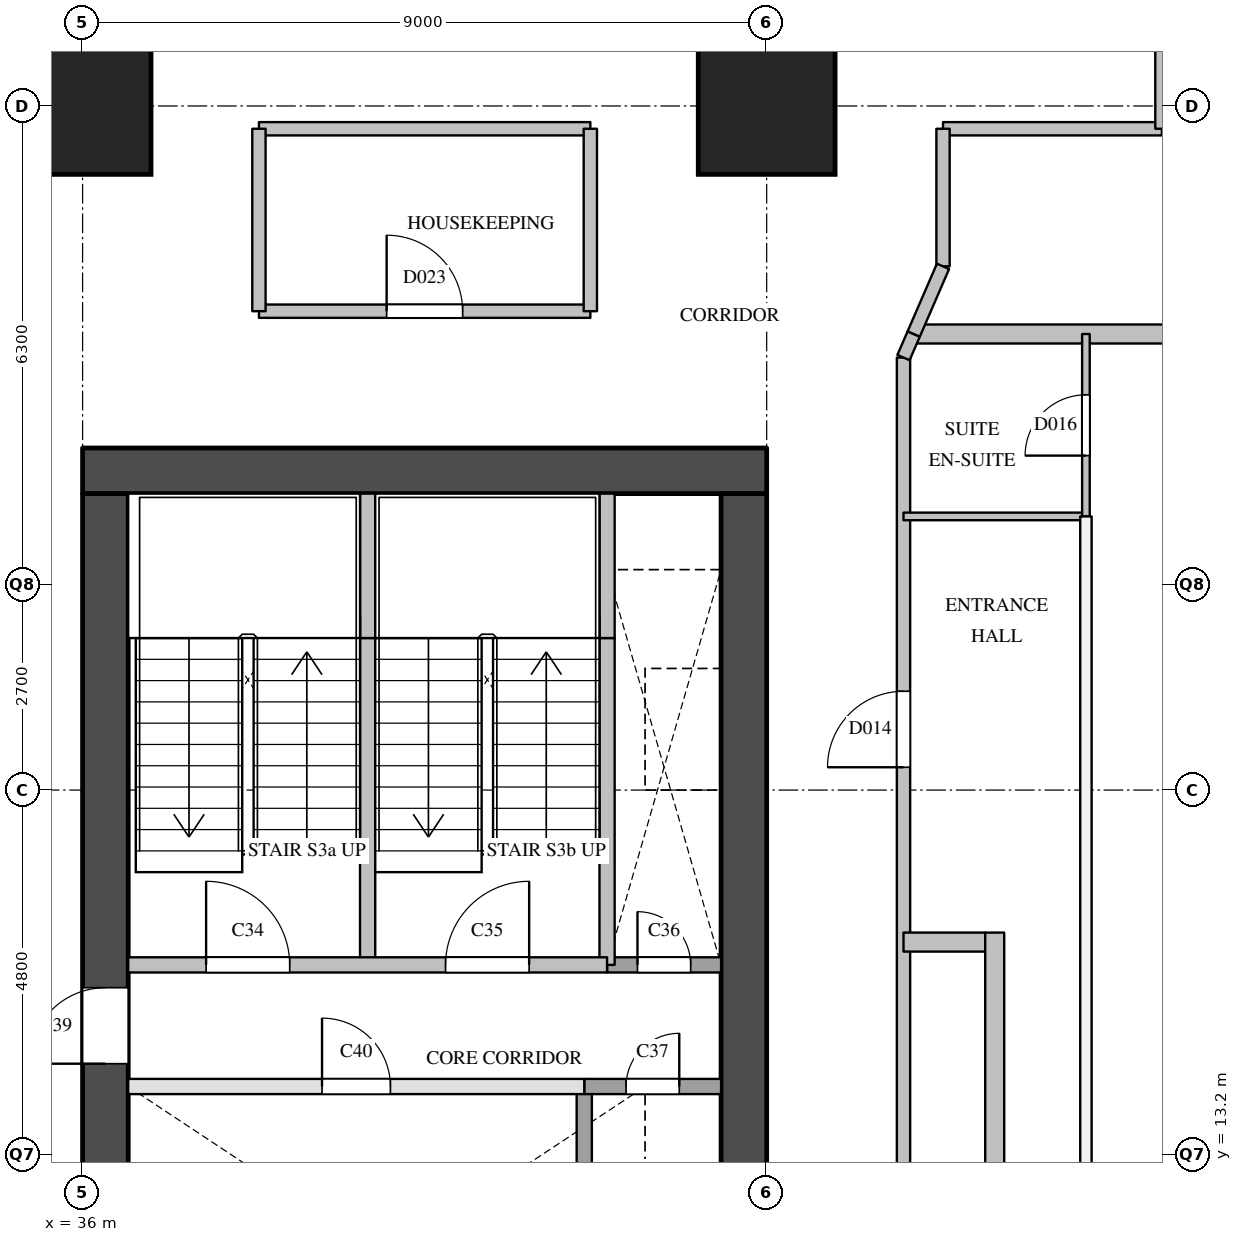
"""IFC4 building model, lengths in metres.
Left out: names, types, materials, properties, quantities, classifications, styles, units other than length and angle.
Written with IfcOpenShell. Run it as: python <this file> out.ifc"""

import sys

from ifc_helpers import new_model, si_unit, direction, frame, frame_2d, origin, origin_2d, place, context, subcontext, project, spatial, rectangle, extrude, element, fill, save


model = new_model("IFC4")
c1 = context("Model", 3, precision=1e-05, world=origin(), true_north=direction((0.0, 1.0)))
c2 = subcontext(c1, "Body", "Model", "MODEL_VIEW")
j1 = project(units=[si_unit("LENGTHUNIT", "METRE"), si_unit("PLANEANGLEUNIT", "RADIAN")], contexts=[c1])
p1 = place(None, origin())
s1 = spatial("IfcSite", under=j1, at=p1, CompositionType="ELEMENT")
p2 = place(p1, origin())
s2 = spatial("IfcBuilding", under=s1, at=p2, CompositionType="ELEMENT")
p3 = place(p2, frame((0.0, 0.0, 81.6)))
s3 = spatial("IfcBuildingStorey", under=s2, at=p3, CompositionType="ELEMENT", Elevation=81.6)
for number, where, z_axis, x_axis in (
    (1, (36.0, 27.0, 0.0), (0.0, 0.0, 1.0), (1.0, 0.0, 0.0)),
    (2, (45.0, 27.0, 0.0), (0.0, 0.0, 1.0), (1.0, 0.0, 0.0)),
):
    element("IfcColumn", number, at=place(p3, frame(where, z_axis=z_axis, x_axis=x_axis)), inside=s3, PredefinedType="COLUMN", context=c2, shape_type="SweptSolid", body=[
        extrude(rectangle(XDim=1.8, YDim=1.8, at=origin_2d()), origin(), (0.0, 0.0, 1.0), 3.8),
    ])
p4 = place(p3, frame((36.0, 22.2, 0.0), z_axis=(0.0, 0.0, 1.0), x_axis=(1.0, 0.0, 0.0)))
e3 = element("IfcWall", 3, at=p4, inside=s3, PredefinedType="SHEAR", context=c2, shape_type="SweptSolid", body=[
    extrude(rectangle(XDim=9.0, YDim=0.6, at=frame_2d((4.5, 0.0))), origin(), (0.0, 0.0, 1.0), 3.5),
])
p5 = place(p3, frame((36.3, 9.6, 0.0), z_axis=(0.0, 0.0, 1.0), x_axis=(0.0, 1.0, 0.0)))
e4 = element("IfcWall", 4, at=p5, inside=s3, PredefinedType="SHEAR", context=c2, shape_type="SweptSolid", body=[
    extrude(rectangle(XDim=12.3, YDim=0.6, at=frame_2d((6.15, 0.0))), origin(), (0.0, 0.0, 1.0), 3.5),
])
p6 = place(p5, frame((0.525, 0.0, 0.0)))
e5 = element("IfcOpeningElement", 5, at=p6, cuts=e4, PredefinedType="OPENING", context=c2, shape_type="SweptSolid", body=[
    extrude(rectangle(XDim=1.2, YDim=2.1, at=frame_2d((0.6, 1.05))), frame((0.0, 0.31, 0.0), z_axis=(0.0, -1.0, 0.0), x_axis=(1.0, 0.0, 0.0)), (0.0, 0.0, 1.0), 0.62),
])
p7 = place(p5, frame((4.8, 0.0, 0.0)))
e6 = element("IfcOpeningElement", 6, at=p7, cuts=e4, PredefinedType="OPENING", context=c2, shape_type="SweptSolid", body=[
    extrude(rectangle(XDim=1.0, YDim=2.1, at=frame_2d((0.5, 1.05))), frame((0.0, 0.31, 0.0), z_axis=(0.0, -1.0, 0.0), x_axis=(1.0, 0.0, 0.0)), (0.0, 0.0, 1.0), 0.62),
])
p8 = place(p3, frame((44.7, 9.6, 0.0), z_axis=(0.0, 0.0, 1.0), x_axis=(0.0, 1.0, 0.0)))
e7 = element("IfcWall", 7, at=p8, inside=s3, PredefinedType="SHEAR", context=c2, shape_type="SweptSolid", body=[
    extrude(rectangle(XDim=12.3, YDim=0.6, at=frame_2d((6.15, 0.0))), origin(), (0.0, 0.0, 1.0), 3.5),
])
p9 = place(p8, frame((0.8, 0.0, 0.0)))
e8 = element("IfcOpeningElement", 8, at=p9, cuts=e7, PredefinedType="OPENING", context=c2, shape_type="SweptSolid", body=[
    extrude(rectangle(XDim=0.7, YDim=2.1, at=frame_2d((0.35, 1.05))), frame((0.0, 0.31, 0.0), z_axis=(0.0, -1.0, 0.0), x_axis=(1.0, 0.0, 0.0)), (0.0, 0.0, 1.0), 0.62),
])
p10 = place(p3, frame((39.75, 15.7, 0.0), z_axis=(0.0, 0.0, 1.0), x_axis=(0.0, 1.0, 0.0)))
e9 = element("IfcWall", 9, at=p10, inside=s3, PredefinedType="SOLIDWALL", context=c2, shape_type="SweptSolid", body=[
    extrude(rectangle(XDim=4.3, YDim=0.2, at=frame_2d((2.15, 0.0))), origin(), (0.0, 0.0, 1.0), 3.5),
])
p11 = place(p3, frame((39.75, 20.0, 0.0), z_axis=(0.0, 0.0, 1.0), x_axis=(0.0, 1.0, 0.0)))
e10 = element("IfcWall", 10, at=p11, inside=s3, PredefinedType="SOLIDWALL", context=c2, shape_type="SweptSolid", body=[
    extrude(rectangle(XDim=1.9, YDim=0.2, at=frame_2d((0.95, 0.0))), origin(), (0.0, 0.0, 1.0), 3.5),
])
p12 = place(p3, frame((42.6, 11.9, 0.0), z_axis=(0.0, 0.0, 1.0), x_axis=(0.0, 1.0, 0.0)))
e11 = element("IfcWall", 11, at=p12, inside=s3, PredefinedType="SOLIDWALL", context=c2, shape_type="SweptSolid", body=[
    extrude(rectangle(XDim=2.2, YDim=0.2, at=frame_2d((1.1, 0.0))), origin(), (0.0, 0.0, 1.0), 3.5),
])
p13 = place(p3, frame((42.9, 15.7, 0.0), z_axis=(0.0, 0.0, 1.0), x_axis=(0.0, 1.0, 0.0)))
e12 = element("IfcWall", 12, at=p13, inside=s3, PredefinedType="SOLIDWALL", context=c2, shape_type="SweptSolid", body=[
    extrude(rectangle(XDim=4.3, YDim=0.2, at=frame_2d((2.15, 0.0))), origin(), (0.0, 0.0, 1.0), 3.5),
])
p14 = place(p3, frame((42.9, 20.0, 0.0), z_axis=(0.0, 0.0, 1.0), x_axis=(0.0, 1.0, 0.0)))
e13 = element("IfcWall", 13, at=p14, inside=s3, PredefinedType="SOLIDWALL", context=c2, shape_type="SweptSolid", body=[
    extrude(rectangle(XDim=1.9, YDim=0.2, at=frame_2d((0.95, 0.0))), origin(), (0.0, 0.0, 1.0), 3.5),
])
p15 = place(p3, frame((36.6, 14.1, 0.0), z_axis=(0.0, 0.0, 1.0), x_axis=(1.0, 0.0, 0.0)))
e14 = element("IfcWall", 14, at=p15, inside=s3, PredefinedType="PARTITIONING", context=c2, shape_type="SweptSolid", body=[
    extrude(rectangle(XDim=6.0, YDim=0.2, at=frame_2d((3.0, 0.0))), origin(), (0.0, 0.0, 1.0), 3.5),
])
p16 = place(p15, frame((2.55, 0.0, 0.0)))
e15 = element("IfcOpeningElement", 15, at=p16, cuts=e14, PredefinedType="OPENING", context=c2, shape_type="SweptSolid", body=[
    extrude(rectangle(XDim=0.9, YDim=2.1, at=frame_2d((0.45, 1.05))), frame((0.0, 0.11, 0.0), z_axis=(0.0, -1.0, 0.0), x_axis=(1.0, 0.0, 0.0)), (0.0, 0.0, 1.0), 0.22),
])
p17 = place(p3, frame((42.6, 14.1, 0.0), z_axis=(0.0, 0.0, 1.0), x_axis=(1.0, 0.0, 0.0)))
e16 = element("IfcWall", 16, at=p17, inside=s3, PredefinedType="SOLIDWALL", context=c2, shape_type="SweptSolid", body=[
    extrude(rectangle(XDim=1.8, YDim=0.2, at=frame_2d((0.9, 0.0))), origin(), (0.0, 0.0, 1.0), 3.5),
])
p18 = place(p17, frame((0.55, 0.0, 0.0)))
e17 = element("IfcOpeningElement", 17, at=p18, cuts=e16, PredefinedType="OPENING", context=c2, shape_type="SweptSolid", body=[
    extrude(rectangle(XDim=0.7, YDim=2.1, at=frame_2d((0.35, 1.05))), frame((0.0, 0.11, 0.0), z_axis=(0.0, -1.0, 0.0), x_axis=(1.0, 0.0, 0.0)), (0.0, 0.0, 1.0), 0.22),
])
p19 = place(p3, frame((42.9, 15.7, 0.0), z_axis=(0.0, 0.0, 1.0), x_axis=(1.0, 0.0, 0.0)))
e18 = element("IfcWall", 18, at=p19, inside=s3, PredefinedType="SOLIDWALL", context=c2, shape_type="SweptSolid", body=[
    extrude(rectangle(XDim=1.5, YDim=0.2, at=frame_2d((0.75, 0.0))), origin(), (0.0, 0.0, 1.0), 3.5),
])
p20 = place(p19, frame((0.4, 0.0, 0.0)))
e19 = element("IfcOpeningElement", 19, at=p20, cuts=e18, PredefinedType="OPENING", context=c2, shape_type="SweptSolid", body=[
    extrude(rectangle(XDim=0.7, YDim=2.1, at=frame_2d((0.35, 1.05))), frame((0.0, 0.11, 0.0), z_axis=(0.0, -1.0, 0.0), x_axis=(1.0, 0.0, 0.0)), (0.0, 0.0, 1.0), 0.22),
])
p21 = place(p3, frame((36.6, 15.7, 0.0), z_axis=(0.0, 0.0, 1.0), x_axis=(1.0, 0.0, 0.0)))
e20 = element("IfcWall", 20, at=p21, inside=s3, PredefinedType="SOLIDWALL", context=c2, shape_type="SweptSolid", body=[
    extrude(rectangle(XDim=6.3, YDim=0.2, at=frame_2d((3.15, 0.0))), origin(), (0.0, 0.0, 1.0), 3.5),
])
p22 = place(p21, frame((1.025, 0.0, 0.0)))
e21 = element("IfcOpeningElement", 21, at=p22, cuts=e20, PredefinedType="OPENING", context=c2, shape_type="SweptSolid", body=[
    extrude(rectangle(XDim=1.1, YDim=2.1, at=frame_2d((0.55, 1.05))), frame((0.0, 0.11, 0.0), z_axis=(0.0, -1.0, 0.0), x_axis=(1.0, 0.0, 0.0)), (0.0, 0.0, 1.0), 0.22),
])
p23 = place(p21, frame((4.175, 0.0, 0.0)))
e22 = element("IfcOpeningElement", 22, at=p23, cuts=e20, PredefinedType="OPENING", context=c2, shape_type="SweptSolid", body=[
    extrude(rectangle(XDim=1.1, YDim=2.1, at=frame_2d((0.55, 1.05))), frame((0.0, 0.11, 0.0), z_axis=(0.0, -1.0, 0.0), x_axis=(1.0, 0.0, 0.0)), (0.0, 0.0, 1.0), 0.22),
])
p24 = place(p3, frame((38.32, 24.3, 0.0), z_axis=(0.0, 0.0, 1.0), x_axis=(1.0, 0.0, 0.0)))
e23 = element("IfcWall", 23, at=p24, inside=s3, PredefinedType="PARTITIONING", context=c2, shape_type="SweptSolid", body=[
    extrude(rectangle(XDim=4.36, YDim=0.175, at=frame_2d((2.18, 0.0))), origin(), (0.0, 0.0, 1.0), 3.5),
])
p25 = place(p24, frame((1.68, 0.0, 0.0)))
e24 = element("IfcOpeningElement", 24, at=p25, cuts=e23, PredefinedType="OPENING", context=c2, shape_type="SweptSolid", body=[
    extrude(rectangle(XDim=1.0, YDim=2.1, at=frame_2d((0.5, 1.05))), frame((0.0, 0.097, 0.0), z_axis=(0.0, -1.0, 0.0), x_axis=(1.0, 0.0, 0.0)), (0.0, 0.0, 1.0), 0.195),
])
p26 = place(p3, frame((38.32, 26.7, 0.0), z_axis=(0.0, 0.0, 1.0), x_axis=(1.0, 0.0, 0.0)))
e25 = element("IfcWall", 25, at=p26, inside=s3, PredefinedType="PARTITIONING", context=c2, shape_type="SweptSolid", body=[
    extrude(rectangle(XDim=4.36, YDim=0.175, at=frame_2d((2.18, 0.0))), origin(), (0.0, 0.0, 1.0), 2.5),
])
p27 = place(p3, frame((47.32, 26.7, 0.0), z_axis=(0.0, 0.0, 1.0), x_axis=(1.0, 0.0, 0.0)))
e26 = element("IfcWall", 26, at=p27, inside=s3, PredefinedType="PARTITIONING", context=c2, shape_type="SweptSolid", body=[
    extrude(rectangle(XDim=2.88, YDim=0.175, at=frame_2d((1.44, 0.0))), origin(), (0.0, 0.0, 1.0), 2.5),
])
for number, where, z_axis, x_axis in (
    (27, (38.32, 24.3, 0.0), (0.0, 0.0, 1.0), (0.0, 1.0, 0.0)),
    (28, (42.68, 24.3, 0.0), (0.0, 0.0, 1.0), (0.0, 1.0, 0.0)),
):
    element("IfcWall", number, at=place(p3, frame(where, z_axis=z_axis, x_axis=x_axis)), inside=s3, PredefinedType="PARTITIONING", context=c2, shape_type="SweptSolid", body=[
        extrude(rectangle(XDim=2.4, YDim=0.175, at=frame_2d((1.2, 0.0))), origin(), (0.0, 0.0, 1.0), 2.5),
    ])
p28 = place(p3, frame((46.8, 7.2, 0.0), z_axis=(0.0, 0.0, 1.0), x_axis=(0.0, 1.0, 0.0)))
e29 = element("IfcWall", 29, at=p28, inside=s3, PredefinedType="PARTITIONING", context=c2, shape_type="SweptSolid", body=[
    extrude(rectangle(XDim=16.49, YDim=0.175, at=frame_2d((8.245, 0.0))), origin(), (0.0, 0.0, 1.0), 3.5),
])
p29 = place(p28, frame((4.3, 0.0, 0.0)))
e30 = element("IfcOpeningElement", 30, at=p29, cuts=e29, PredefinedType="OPENING", context=c2, shape_type="SweptSolid", body=[
    extrude(rectangle(XDim=1.0, YDim=2.1, at=frame_2d((0.5, 1.05))), frame((0.0, 0.097, 0.0), z_axis=(0.0, -1.0, 0.0), x_axis=(1.0, 0.0, 0.0)), (0.0, 0.0, 1.0), 0.195),
])
p30 = place(p28, frame((11.1, 0.0, 0.0)))
e31 = element("IfcOpeningElement", 31, at=p30, cuts=e29, PredefinedType="OPENING", context=c2, shape_type="SweptSolid", body=[
    extrude(rectangle(XDim=1.0, YDim=2.1, at=frame_2d((0.5, 1.05))), frame((0.0, 0.097, 0.0), z_axis=(0.0, -1.0, 0.0), x_axis=(1.0, 0.0, 0.0)), (0.0, 0.0, 1.0), 0.195),
])
p31 = place(p3, frame((47.32, 24.89, 0.0), z_axis=(0.0, 0.0, 1.0), x_axis=(0.0, 1.0, 0.0)))
e32 = element("IfcWall", 32, at=p31, inside=s3, PredefinedType="PARTITIONING", context=c2, shape_type="SweptSolid", body=[
    extrude(rectangle(XDim=1.81, YDim=0.175, at=frame_2d((0.905, 0.0))), origin(), (0.0, 0.0, 1.0), 2.5),
])
p32 = place(p3, frame((50.2, 26.7, 0.0), z_axis=(0.0, 0.0, 1.0), x_axis=(0.0, 1.0, 0.0)))
e33 = element("IfcWall", 33, at=p32, inside=s3, PredefinedType="PARTITIONING", context=c2, shape_type="SweptSolid", body=[
    extrude(rectangle(XDim=25.1, YDim=0.175, at=frame_2d((12.55, 0.0))), origin(), (0.0, 0.0, 1.0), 2.5),
])
p33 = place(p32, frame((4.2, 0.0, 0.0)))
e34 = element("IfcOpeningElement", 34, at=p33, cuts=e33, PredefinedType="OPENING", context=c2, shape_type="SweptSolid", body=[
    extrude(rectangle(XDim=0.9, YDim=2.1, at=frame_2d((0.45, 1.05))), frame((0.0, 0.097, 0.0), z_axis=(0.0, -1.0, 0.0), x_axis=(1.0, 0.0, 0.0)), (0.0, 0.0, 1.0), 0.195),
])
p34 = place(p32, frame((14.85, 0.0, 0.0)))
e35 = element("IfcOpeningElement", 35, at=p34, cuts=e33, PredefinedType="OPENING", context=c2, shape_type="SweptSolid", body=[
    extrude(rectangle(XDim=0.9, YDim=2.1, at=frame_2d((0.45, 1.05))), frame((0.0, 0.097, 0.0), z_axis=(0.0, -1.0, 0.0), x_axis=(1.0, 0.0, 0.0)), (0.0, 0.0, 1.0), 0.195),
])
p35 = place(p3, frame((49.2, 0.0, 0.0), z_axis=(0.0, 0.0, 1.0), x_axis=(0.0, 1.0, 0.0)))
e36 = element("IfcWall", 36, at=p35, inside=s3, PredefinedType="PARTITIONING", context=c2, shape_type="SweptSolid", body=[
    extrude(rectangle(XDim=21.6, YDim=0.15, at=frame_2d((10.8, 0.0))), origin(), (0.0, 0.0, 1.0), 2.5),
])
p36 = place(p35, frame((10.35, 0.0, 0.0)))
e37 = element("IfcOpeningElement", 37, at=p36, cuts=e36, PredefinedType="OPENING", context=c2, shape_type="SweptSolid", body=[
    extrude(rectangle(XDim=0.9, YDim=2.1, at=frame_2d((0.45, 1.05))), frame((0.0, 0.085, 0.0), z_axis=(0.0, -1.0, 0.0), x_axis=(1.0, 0.0, 0.0)), (0.0, 0.0, 1.0), 0.17),
])
p37 = place(p3, frame((46.8, 16.0, 0.0), z_axis=(0.0, 0.0, 1.0), x_axis=(1.0, 0.0, 0.0)))
e38 = element("IfcWall", 38, at=p37, inside=s3, PredefinedType="PARTITIONING", context=c2, shape_type="SweptSolid", body=[
    extrude(rectangle(XDim=1.075, YDim=0.25, at=frame_2d((0.538, 0.0))), origin(), (0.0, 0.0, 1.0), 3.5),
])
p38 = place(p3, frame((46.934, 24.0, 0.0), z_axis=(0.0, 0.0, 1.0), x_axis=(1.0, 0.0, 0.0)))
e39 = element("IfcWall", 39, at=p38, inside=s3, PredefinedType="PARTITIONING", context=c2, shape_type="SweptSolid", body=[
    extrude(rectangle(XDim=7.066, YDim=0.25, at=frame_2d((3.533, 0.0))), origin(), (0.0, 0.0, 1.0), 2.5),
])
p39 = place(p3, frame((48.0, 0.0, 0.0), z_axis=(0.0, 0.0, 1.0), x_axis=(0.0, 1.0, 0.0)))
e40 = element("IfcWall", 40, at=p39, inside=s3, PredefinedType="PARTITIONING", context=c2, shape_type="SweptSolid", body=[
    extrude(rectangle(XDim=16.125, YDim=0.25, at=frame_2d((8.062, 0.0))), origin(), (0.0, 0.0, 1.0), 2.5),
])
p40 = place(p3, frame((46.8, 21.6, 0.0), z_axis=(0.0, 0.0, 1.0), x_axis=(1.0, 0.0, 0.0)))
e41 = element("IfcWall", 41, at=p40, inside=s3, PredefinedType="PARTITIONING", context=c2, shape_type="SweptSolid", body=[
    extrude(rectangle(XDim=2.4, YDim=0.1, at=frame_2d((1.2, 0.0))), origin(), (0.0, 0.0, 1.0), 3.5),
])
p41 = place(p3, frame((49.2, 21.6, 0.0), z_axis=(0.0, 0.0, 1.0), x_axis=(0.0, 1.0, 0.0)))
e42 = element("IfcWall", 42, at=p41, inside=s3, PredefinedType="PARTITIONING", context=c2, shape_type="SweptSolid", body=[
    extrude(rectangle(XDim=2.4, YDim=0.1, at=frame_2d((1.2, 0.0))), origin(), (0.0, 0.0, 1.0), 3.5),
])
p42 = place(p41, frame((0.8, 0.0, 0.0)))
e43 = element("IfcOpeningElement", 43, at=p42, cuts=e42, PredefinedType="OPENING", context=c2, shape_type="SweptSolid", body=[
    extrude(rectangle(XDim=0.8, YDim=2.1, at=frame_2d((0.4, 1.05))), frame((0.0, 0.06, 0.0), z_axis=(0.0, -1.0, 0.0), x_axis=(1.0, 0.0, 0.0)), (0.0, 0.0, 1.0), 0.12),
])
p43 = place(p3, frame((46.934, 24.0, 0.0), z_axis=(0.0, 0.0, 1.0), x_axis=(-0.397404653206, -0.917643471949, 0.0)))
e44 = element("IfcWall", 44, at=p43, inside=s3, PredefinedType="PARTITIONING", context=c2, shape_type="SweptSolid", body=[
    extrude(rectangle(XDim=0.338, YDim=0.175, at=frame_2d((0.169, 0.0))), origin(), (0.0, 0.0, 1.0), 3.5),
])
p44 = place(p3, frame((47.32, 24.89, 0.0), z_axis=(0.0, 0.0, 1.0), x_axis=(-0.397713396445, -0.917509702558, 0.0)))
e45 = element("IfcWall", 45, at=p44, inside=s3, PredefinedType="PARTITIONING", context=c2, shape_type="SweptSolid", body=[
    extrude(rectangle(XDim=0.97, YDim=0.175, at=frame_2d((0.485, 0.0))), origin(), (0.0, 0.0, 1.0), 3.5),
])
p45 = place(p22, origin())
e46 = element("IfcDoor", 46, at=p45, inside=s3, OperationType="SINGLE_SWING_LEFT", PredefinedType="DOOR", context=c2, shape_type="SweptSolid", body=[
    extrude(rectangle(XDim=1.1, YDim=2.1, at=frame_2d((0.55, 1.05))), frame((0.0, 0.025, 0.0), z_axis=(0.0, -1.0, 0.0), x_axis=(1.0, 0.0, 0.0)), (0.0, 0.0, 1.0), 0.05),
])
fill(e21, e46)
p46 = place(p23, origin())
e47 = element("IfcDoor", 47, at=p46, inside=s3, OperationType="SINGLE_SWING_RIGHT", PredefinedType="DOOR", context=c2, shape_type="SweptSolid", body=[
    extrude(rectangle(XDim=1.1, YDim=2.1, at=frame_2d((0.55, 1.05))), frame((0.0, 0.025, 0.0), z_axis=(0.0, -1.0, 0.0), x_axis=(1.0, 0.0, 0.0)), (0.0, 0.0, 1.0), 0.05),
])
fill(e22, e47)
p47 = place(p20, origin())
e48 = element("IfcDoor", 48, at=p47, inside=s3, OperationType="SINGLE_SWING_LEFT", PredefinedType="DOOR", context=c2, shape_type="SweptSolid", body=[
    extrude(rectangle(XDim=0.7, YDim=2.1, at=frame_2d((0.35, 1.05))), frame((0.0, 0.025, 0.0), z_axis=(0.0, -1.0, 0.0), x_axis=(1.0, 0.0, 0.0)), (0.0, 0.0, 1.0), 0.05),
])
fill(e19, e48)
p48 = place(p18, origin())
e49 = element("IfcDoor", 49, at=p48, inside=s3, OperationType="SINGLE_SWING_RIGHT", PredefinedType="DOOR", context=c2, shape_type="SweptSolid", body=[
    extrude(rectangle(XDim=0.7, YDim=2.1, at=frame_2d((0.35, 1.05))), frame((0.0, 0.025, 0.0), z_axis=(0.0, -1.0, 0.0), x_axis=(1.0, 0.0, 0.0)), (0.0, 0.0, 1.0), 0.05),
])
fill(e17, e49)
p49 = place(p7, origin())
e50 = element("IfcDoor", 50, at=p49, inside=s3, OperationType="SINGLE_SWING_LEFT", PredefinedType="DOOR", context=c2, shape_type="SweptSolid", body=[
    extrude(rectangle(XDim=1.0, YDim=2.1, at=frame_2d((0.5, 1.05))), frame((0.0, 0.025, 0.0), z_axis=(0.0, -1.0, 0.0), x_axis=(1.0, 0.0, 0.0)), (0.0, 0.0, 1.0), 0.05),
])
fill(e6, e50)
p50 = place(p16, origin())
e51 = element("IfcDoor", 51, at=p50, inside=s3, OperationType="SINGLE_SWING_LEFT", PredefinedType="DOOR", context=c2, shape_type="SweptSolid", body=[
    extrude(rectangle(XDim=0.9, YDim=2.1, at=frame_2d((0.45, 1.05))), frame((0.0, 0.025, 0.0), z_axis=(0.0, -1.0, 0.0), x_axis=(1.0, 0.0, 0.0)), (0.0, 0.0, 1.0), 0.05),
])
fill(e15, e51)
p51 = place(p30, origin())
e52 = element("IfcDoor", 52, at=p51, inside=s3, OperationType="SINGLE_SWING_LEFT", PredefinedType="DOOR", context=c2, shape_type="SweptSolid", body=[
    extrude(rectangle(XDim=1.0, YDim=2.1, at=frame_2d((0.5, 1.05))), frame((0.0, 0.025, 0.0), z_axis=(0.0, -1.0, 0.0), x_axis=(1.0, 0.0, 0.0)), (0.0, 0.0, 1.0), 0.05),
])
fill(e31, e52)
p52 = place(p42, origin())
e53 = element("IfcDoor", 53, at=p52, inside=s3, OperationType="SINGLE_SWING_LEFT", PredefinedType="DOOR", context=c2, shape_type="SweptSolid", body=[
    extrude(rectangle(XDim=0.8, YDim=2.1, at=frame_2d((0.4, 1.05))), frame((0.0, 0.025, 0.0), z_axis=(0.0, -1.0, 0.0), x_axis=(1.0, 0.0, 0.0)), (0.0, 0.0, 1.0), 0.05),
])
fill(e43, e53)
p53 = place(p25, origin())
e54 = element("IfcDoor", 54, at=p53, inside=s3, OperationType="SINGLE_SWING_LEFT", PredefinedType="DOOR", context=c2, shape_type="SweptSolid", body=[
    extrude(rectangle(XDim=1.0, YDim=2.1, at=frame_2d((0.5, 1.05))), frame((0.0, 0.025, 0.0), z_axis=(0.0, -1.0, 0.0), x_axis=(1.0, 0.0, 0.0)), (0.0, 0.0, 1.0), 0.05),
])
fill(e24, e54)
save(model, sys.argv[1])
